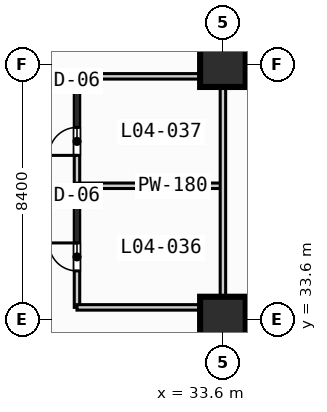
"""IFC4 building model, lengths in metres.
Left out: names, types, materials, properties, quantities, classifications, styles, units other than length and angle.
Written with IfcOpenShell. Run it as: python <this file> out.ifc"""

import sys

from ifc_helpers import new_model, si_unit, direction, frame, frame_2d, origin, origin_2d, place, context, subcontext, project, spatial, rectangle, extrude, element, fill, save


model = new_model("IFC4")
c1 = context("Model", 3, precision=1e-05, world=origin(), true_north=direction((0.0, 1.0)))
c2 = subcontext(c1, "Body", "Model", "MODEL_VIEW")
j1 = project(units=[si_unit("LENGTHUNIT", "METRE"), si_unit("PLANEANGLEUNIT", "RADIAN")], contexts=[c1])
p1 = place(None, origin())
s1 = spatial("IfcSite", under=j1, at=p1, CompositionType="ELEMENT")
p2 = place(p1, origin())
s2 = spatial("IfcBuilding", under=s1, at=p2, CompositionType="ELEMENT")
p3 = place(p2, frame((0.0, 0.0, 20.8)))
s3 = spatial("IfcBuildingStorey", under=s2, at=p3, CompositionType="ELEMENT", Elevation=20.8)
for number, where, z_axis, x_axis in (
    (1, (33.6, 33.6, 0.0), (0.0, 0.0, 1.0), (1.0, 0.0, 0.0)),
    (2, (33.6, 42.0, 0.0), (0.0, 0.0, 1.0), (1.0, 0.0, 0.0)),
):
    element("IfcColumn", number, at=place(p3, frame(where, z_axis=z_axis, x_axis=x_axis)), inside=s3, PredefinedType="COLUMN", context=c2, shape_type="SweptSolid", body=[
        extrude(rectangle(XDim=1.5, YDim=1.5, at=origin_2d()), origin(), (0.0, 0.0, 1.0), 5.2),
    ])
p4 = place(p3, frame((28.8, 34.0, 0.0), z_axis=(0.0, 0.0, 1.0), x_axis=(0.0, 1.0, 0.0)))
e3 = element("IfcWall", 3, at=p4, inside=s3, PredefinedType="PLUMBINGWALL", context=c2, shape_type="SweptSolid", body=[
    extrude(rectangle(XDim=7.6, YDim=0.18, at=frame_2d((3.8, 0.0))), origin(), (0.0, 0.0, 1.0), 4.75),
])
p5 = place(p4, frame((1.2, 0.0, 0.0)))
e4 = element("IfcOpeningElement", 4, at=p5, cuts=e3, PredefinedType="OPENING", context=c2, shape_type="SweptSolid", body=[
    extrude(rectangle(XDim=0.92, YDim=2.1, at=frame_2d((0.46, 1.05))), frame((0.0, 0.1, 0.0), z_axis=(0.0, -1.0, 0.0), x_axis=(1.0, 0.0, 0.0)), (0.0, 0.0, 1.0), 0.2),
])
p6 = place(p4, frame((5.0, 0.0, 0.0)))
e5 = element("IfcOpeningElement", 5, at=p6, cuts=e3, PredefinedType="OPENING", context=c2, shape_type="SweptSolid", body=[
    extrude(rectangle(XDim=0.92, YDim=2.1, at=frame_2d((0.46, 1.05))), frame((0.0, 0.1, 0.0), z_axis=(0.0, -1.0, 0.0), x_axis=(1.0, 0.0, 0.0)), (0.0, 0.0, 1.0), 0.2),
])
p7 = place(p3, frame((28.8, 38.0, 0.0), z_axis=(0.0, 0.0, 1.0), x_axis=(1.0, 0.0, 0.0)))
e6 = element("IfcWall", 6, at=p7, inside=s3, PredefinedType="PLUMBINGWALL", context=c2, shape_type="SweptSolid", body=[
    extrude(rectangle(XDim=4.8, YDim=0.18, at=frame_2d((2.4, 0.0))), origin(), (0.0, 0.0, 1.0), 4.75),
])
p8 = place(p3, frame((33.6, 34.0, 0.0), z_axis=(0.0, 0.0, 1.0), x_axis=(0.0, 1.0, 0.0)))
e7 = element("IfcWall", 7, at=p8, inside=s3, PredefinedType="PLUMBINGWALL", context=c2, shape_type="SweptSolid", body=[
    extrude(rectangle(XDim=7.6, YDim=0.18, at=frame_2d((3.8, 0.0))), origin(), (0.0, 0.0, 1.0), 4.211),
])
p9 = place(p3, frame((28.8, 34.0, 0.0), z_axis=(0.0, 0.0, 1.0), x_axis=(1.0, 0.0, 0.0)))
e8 = element("IfcWall", 8, at=p9, inside=s3, PredefinedType="PLUMBINGWALL", context=c2, shape_type="SweptSolid", body=[
    extrude(rectangle(XDim=4.8, YDim=0.18, at=frame_2d((2.4, 0.0))), origin(), (0.0, 0.0, 1.0), 4.75),
])
p10 = place(p3, frame((28.8, 41.6, 0.0), z_axis=(0.0, 0.0, 1.0), x_axis=(1.0, 0.0, 0.0)))
e9 = element("IfcWall", 9, at=p10, inside=s3, PredefinedType="PLUMBINGWALL", context=c2, shape_type="SweptSolid", body=[
    extrude(rectangle(XDim=4.8, YDim=0.18, at=frame_2d((2.4, 0.0))), origin(), (0.0, 0.0, 1.0), 3.9),
])
p11 = place(p5, origin())
e10 = element("IfcDoor", 10, at=p11, inside=s3, OperationType="SINGLE_SWING_RIGHT", PredefinedType="DOOR", context=c2, shape_type="SweptSolid", body=[
    extrude(rectangle(XDim=0.92, YDim=2.1, at=frame_2d((0.46, 1.05))), frame((0.0, 0.025, 0.0), z_axis=(0.0, -1.0, 0.0), x_axis=(1.0, 0.0, 0.0)), (0.0, 0.0, 1.0), 0.05),
])
fill(e4, e10)
p12 = place(p6, origin())
e11 = element("IfcDoor", 11, at=p12, inside=s3, OperationType="SINGLE_SWING_LEFT", PredefinedType="DOOR", context=c2, shape_type="SweptSolid", body=[
    extrude(rectangle(XDim=0.92, YDim=2.1, at=frame_2d((0.46, 1.05))), frame((0.0, 0.025, 0.0), z_axis=(0.0, -1.0, 0.0), x_axis=(1.0, 0.0, 0.0)), (0.0, 0.0, 1.0), 0.05),
])
fill(e5, e11)
save(model, sys.argv[1])
